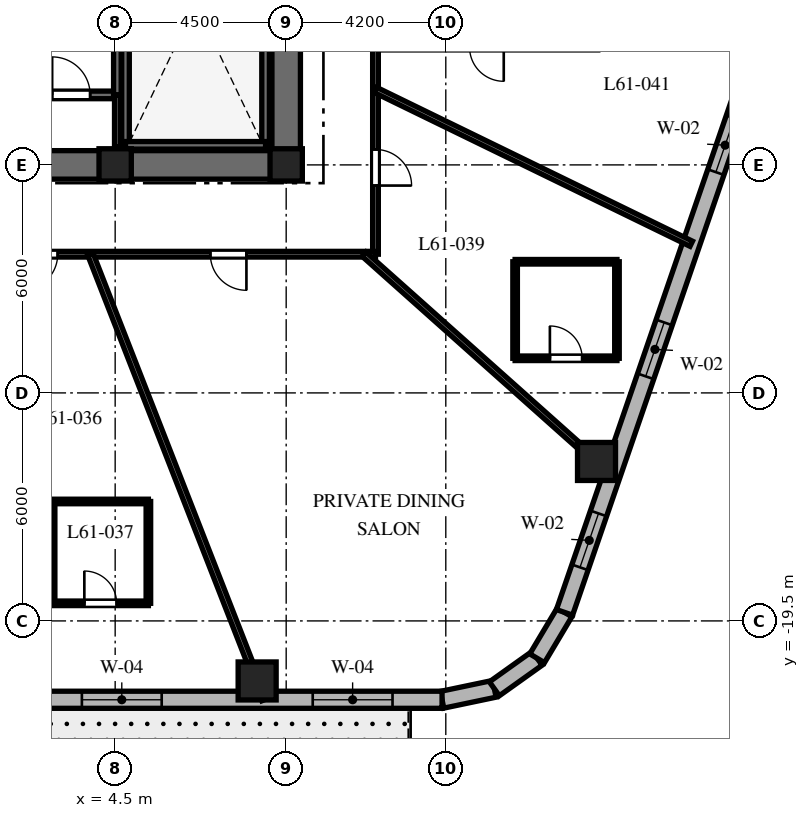
"""IFC4 building model, lengths in metres.
Left out: names, types, materials, properties, quantities, classifications, styles, units other than length and angle.
Written with IfcOpenShell. Run it as: python <this file> out.ifc"""

import sys

from ifc_helpers import new_model, si_unit, direction, frame, frame_2d, origin, origin_2d, place, context, subcontext, project, spatial, rectangle, extrude, element, fill, save


model = new_model("IFC4")
c1 = context("Model", 3, precision=1e-05, world=origin(), true_north=direction((0.0, 1.0)))
c2 = subcontext(c1, "Body", "Model", "MODEL_VIEW")
j1 = project(units=[si_unit("LENGTHUNIT", "METRE"), si_unit("PLANEANGLEUNIT", "RADIAN")], contexts=[c1])
p1 = place(None, origin())
s1 = spatial("IfcSite", under=j1, at=p1, CompositionType="ELEMENT")
p2 = place(p1, origin())
s2 = spatial("IfcBuilding", under=s1, at=p2, CompositionType="ELEMENT")
p3 = place(p2, frame((0.0, 0.0, 244.5)))
s3 = spatial("IfcBuildingStorey", under=s2, at=p3, CompositionType="ELEMENT", Elevation=244.5)
p4 = place(p3, frame((-9.375, -7.5, 0.0), z_axis=(0.0, 0.0, 1.0), x_axis=(1.0, 0.0, 0.0)))
e1 = element("IfcWall", 1, at=p4, inside=s3, PredefinedType="SHEAR", context=c2, shape_type="SweptSolid", body=[
    extrude(rectangle(XDim=18.75, YDim=0.75, at=frame_2d((9.375, 0.0))), origin(), (0.0, 0.0, 1.0), 3.8),
])
p5 = place(p4, frame((9.425, 0.0, 0.0)))
e2 = element("IfcOpeningElement", 2, at=p5, cuts=e1, PredefinedType="OPENING", context=c2, shape_type="SweptSolid", body=[
    extrude(rectangle(XDim=1.0, YDim=2.15, at=frame_2d((0.5, 1.075))), frame((0.0, 0.385, 0.0), z_axis=(0.0, -1.0, 0.0), x_axis=(1.0, 0.0, 0.0)), (0.0, 0.0, 1.0), 0.77),
])
p6 = place(p3, frame((9.0, -7.125, 0.0), z_axis=(0.0, 0.0, 1.0), x_axis=(0.0, 1.0, 0.0)))
e3 = element("IfcWall", 3, at=p6, inside=s3, PredefinedType="SHEAR", context=c2, shape_type="SweptSolid", body=[
    extrude(rectangle(XDim=14.25, YDim=0.75, at=frame_2d((7.125, 0.0))), origin(), (0.0, 0.0, 1.0), 3.8),
])
p7 = place(p6, frame((10.25, 0.0, 0.0)))
e4 = element("IfcOpeningElement", 4, at=p7, cuts=e3, PredefinedType="OPENING", context=c2, shape_type="SweptSolid", body=[
    extrude(rectangle(XDim=1.05, YDim=2.15, at=frame_2d((0.525, 1.075))), frame((0.0, 0.385, 0.0), z_axis=(0.0, -1.0, 0.0), x_axis=(1.0, 0.0, 0.0)), (0.0, 0.0, 1.0), 0.77),
])
for number, where, z_axis, x_axis in (
    (5, (4.772, -6.985, 0.0), (0.0, 0.0, 1.0), (0.0, 1.0, 0.0)),
    (6, (8.458, -6.985, 0.0), (0.0, 0.0, 1.0), (0.0, 1.0, 0.0)),
):
    element("IfcWall", number, at=place(p3, frame(where, z_axis=z_axis, x_axis=x_axis)), inside=s3, PredefinedType="SHEAR", context=c2, shape_type="SweptSolid", body=[
        extrude(rectangle(XDim=9.143, YDim=0.2, at=frame_2d((4.572, 0.0))), origin(), (0.0, 0.0, 1.0), 3.8),
    ])
p8 = place(p3, frame((4.772, -6.985, 0.0), z_axis=(0.0, 0.0, 1.0), x_axis=(1.0, 0.0, 0.0)))
e7 = element("IfcWall", 7, at=p8, inside=s3, PredefinedType="SHEAR", context=c2, shape_type="SweptSolid", body=[
    extrude(rectangle(XDim=3.686, YDim=0.2, at=frame_2d((1.843, 0.0))), origin(), (0.0, 0.0, 1.0), 3.8),
])
p9 = place(p3, frame((-4.608, -5.658, 0.0), z_axis=(0.0, 0.0, 1.0), x_axis=(1.0, 0.0, 0.0)))
e8 = element("IfcWall", 8, at=p9, inside=s3, PredefinedType="SHEAR", context=c2, shape_type="SweptSolid", body=[
    extrude(rectangle(XDim=9.166, YDim=0.2, at=frame_2d((4.583, 0.0))), origin(), (0.0, 0.0, 1.0), 3.8),
])
p10 = place(p9, frame((7.45, 0.0, 0.0)))
e9 = element("IfcOpeningElement", 9, at=p10, cuts=e8, PredefinedType="OPENING", context=c2, shape_type="SweptSolid", body=[
    extrude(rectangle(XDim=1.0, YDim=2.15, at=frame_2d((0.5, 1.075))), frame((0.0, 0.11, 0.0), z_axis=(0.0, -1.0, 0.0), x_axis=(1.0, 0.0, 0.0)), (0.0, 0.0, 1.0), 0.22),
])
p11 = place(p3, frame((4.558, -5.658, 0.0), z_axis=(0.0, 0.0, 1.0), x_axis=(0.0, 1.0, 0.0)))
e10 = element("IfcWall", 10, at=p11, inside=s3, PredefinedType="SHEAR", context=c2, shape_type="SweptSolid", body=[
    extrude(rectangle(XDim=3.686, YDim=0.2, at=frame_2d((1.843, 0.0))), origin(), (0.0, 0.0, 1.0), 3.8),
])
for number, where, z_axis, x_axis in (
    (11, (4.5, -7.5, 0.0), (0.0, 0.0, 1.0), (1.0, 0.0, 0.0)),
    (12, (9.0, -7.5, 0.0), (0.0, 0.0, 1.0), (1.0, 0.0, 0.0)),
):
    element("IfcColumn", number, at=place(p3, frame(where, z_axis=z_axis, x_axis=x_axis)), inside=s3, PredefinedType="COLUMN", context=c2, shape_type="SweptSolid", body=[
        extrude(rectangle(XDim=0.85, YDim=0.85, at=origin_2d()), origin(), (0.0, 0.0, 1.0), 3.8),
    ])
for number, where, z_axis, x_axis in (
    (13, (8.236, -21.08, 0.0), (0.0, 0.0, 1.0), (1.0, 0.0, 0.0)),
    (14, (17.166, -15.304, 0.0), (0.0, 0.0, 1.0), (1.0, 0.0, 0.0)),
):
    element("IfcColumn", number, at=place(p3, frame(where, z_axis=z_axis, x_axis=x_axis)), inside=s3, PredefinedType="COLUMN", context=c2, shape_type="SweptSolid", body=[
        extrude(rectangle(XDim=1.0, YDim=1.0, at=origin_2d()), origin(), (0.0, 0.0, 1.0), 3.8),
    ])
p12 = place(p3, frame((13.102, -21.575, 0.0), z_axis=(0.0, 0.0, 1.0), x_axis=(0.978757421505, 0.205021730188, 0.0)))
e15 = element("IfcWall", 15, at=p12, inside=s3, PredefinedType="SOLIDWALL", context=c2, shape_type="SweptSolid", body=[
    extrude(rectangle(XDim=1.406, YDim=0.45, at=frame_2d((0.703, 0.0))), origin(), (0.0, 0.0, 1.0), 3.5),
])
p13 = place(p3, frame((14.478, -21.287, 0.0), z_axis=(0.0, 0.0, 1.0), x_axis=(0.813888518617, 0.58102106611, 0.0)))
e16 = element("IfcWall", 16, at=p13, inside=s3, PredefinedType="SOLIDWALL", context=c2, shape_type="SweptSolid", body=[
    extrude(rectangle(XDim=1.383, YDim=0.45, at=frame_2d((0.691, 0.0))), origin(), (0.0, 0.0, 1.0), 3.5),
])
p14 = place(p3, frame((15.604, -20.483, 0.0), z_axis=(0.0, 0.0, 1.0), x_axis=(0.512222149036, 0.858852996756, 0.0)))
e17 = element("IfcWall", 17, at=p14, inside=s3, PredefinedType="SOLIDWALL", context=c2, shape_type="SweptSolid", body=[
    extrude(rectangle(XDim=1.406, YDim=0.45, at=frame_2d((0.703, 0.0))), origin(), (0.0, 0.0, 1.0), 3.5),
])
p15 = place(p3, frame((-11.298, -21.575, 0.0), z_axis=(0.0, 0.0, 1.0), x_axis=(1.0, 0.0, 0.0)))
e18 = element("IfcWall", 18, at=p15, inside=s3, PredefinedType="SOLIDWALL", context=c2, shape_type="SweptSolid", body=[
    extrude(rectangle(XDim=24.399, YDim=0.45, at=frame_2d((12.2, 0.0))), origin(), (0.0, 0.0, 1.0), 3.5),
])
p16 = place(p15, frame((2.55, 0.0, 0.0)))
e19 = element("IfcOpeningElement", 19, at=p16, cuts=e18, PredefinedType="OPENING", context=c2, shape_type="SweptSolid", body=[
    extrude(rectangle(XDim=1.0, YDim=2.15, at=frame_2d((0.5, 1.075))), frame((0.0, 0.235, 0.0), z_axis=(0.0, -1.0, 0.0), x_axis=(1.0, 0.0, 0.0)), (0.0, 0.0, 1.0), 0.47),
])
p17 = place(p15, frame((8.169, 0.0, 0.8)))
e20 = element("IfcOpeningElement", 20, at=p17, cuts=e18, PredefinedType="OPENING", context=c2, shape_type="SweptSolid", body=[
    extrude(rectangle(XDim=2.1, YDim=1.85, at=frame_2d((1.05, 0.925))), frame((0.0, 0.235, 0.0), z_axis=(0.0, -1.0, 0.0), x_axis=(1.0, 0.0, 0.0)), (0.0, 0.0, 1.0), 0.47),
])
p18 = place(p15, frame((14.922, 0.0, 0.8)))
e21 = element("IfcOpeningElement", 21, at=p18, cuts=e18, PredefinedType="OPENING", context=c2, shape_type="SweptSolid", body=[
    extrude(rectangle(XDim=2.1, YDim=1.85, at=frame_2d((1.05, 0.925))), frame((0.0, 0.235, 0.0), z_axis=(0.0, -1.0, 0.0), x_axis=(1.0, 0.0, 0.0)), (0.0, 0.0, 1.0), 0.47),
])
p19 = place(p15, frame((20.996, 0.0, 0.8)))
e22 = element("IfcOpeningElement", 22, at=p19, cuts=e18, PredefinedType="OPENING", context=c2, shape_type="SweptSolid", body=[
    extrude(rectangle(XDim=2.1, YDim=1.85, at=frame_2d((1.05, 0.925))), frame((0.0, 0.235, 0.0), z_axis=(0.0, -1.0, 0.0), x_axis=(1.0, 0.0, 0.0)), (0.0, 0.0, 1.0), 0.47),
])
p20 = place(p3, frame((16.324, -19.275, 0.0), z_axis=(0.0, 0.0, 1.0), x_axis=(0.325083142304, 0.945685439557, 0.0)))
e23 = element("IfcWall", 23, at=p20, inside=s3, PredefinedType="SOLIDWALL", context=c2, shape_type="SweptSolid", body=[
    extrude(rectangle(XDim=20.224, YDim=0.45, at=frame_2d((10.112, 0.0))), origin(), (0.0, 0.0, 1.0), 3.5),
])
p21 = place(p20, frame((1.253, 0.0, 0.8)))
e24 = element("IfcOpeningElement", 24, at=p21, cuts=e23, PredefinedType="OPENING", context=c2, shape_type="SweptSolid", body=[
    extrude(rectangle(XDim=1.5, YDim=1.8, at=frame_2d((0.75, 0.9))), frame((0.0, 0.235, 0.0), z_axis=(0.0, -1.0, 0.0), x_axis=(1.0, 0.0, 0.0)), (0.0, 0.0, 1.0), 0.47),
])
p22 = place(p20, frame((6.568, 0.0, 0.8)))
e25 = element("IfcOpeningElement", 25, at=p22, cuts=e23, PredefinedType="OPENING", context=c2, shape_type="SweptSolid", body=[
    extrude(rectangle(XDim=1.5, YDim=1.8, at=frame_2d((0.75, 0.9))), frame((0.0, 0.235, 0.0), z_axis=(0.0, -1.0, 0.0), x_axis=(1.0, 0.0, 0.0)), (0.0, 0.0, 1.0), 0.47),
])
p23 = place(p20, frame((12.25, 0.0, 0.8)))
e26 = element("IfcOpeningElement", 26, at=p23, cuts=e23, PredefinedType="OPENING", context=c2, shape_type="SweptSolid", body=[
    extrude(rectangle(XDim=1.5, YDim=1.8, at=frame_2d((0.75, 0.9))), frame((0.0, 0.235, 0.0), z_axis=(0.0, -1.0, 0.0), x_axis=(1.0, 0.0, 0.0)), (0.0, 0.0, 1.0), 0.47),
])
p24 = place(p20, frame((17.418, 0.0, 0.8)))
e27 = element("IfcOpeningElement", 27, at=p24, cuts=e23, PredefinedType="OPENING", context=c2, shape_type="SweptSolid", body=[
    extrude(rectangle(XDim=1.5, YDim=1.8, at=frame_2d((0.75, 0.9))), frame((0.0, 0.235, 0.0), z_axis=(0.0, -1.0, 0.0), x_axis=(1.0, 0.0, 0.0)), (0.0, 0.0, 1.0), 0.47),
])
p25 = place(p3, frame((4.558, -7.02, 0.0), z_axis=(0.0, 0.0, 1.0), x_axis=(0.0, 1.0, 0.0)))
e28 = element("IfcWall", 28, at=p25, inside=s3, PredefinedType="PARTITIONING", context=c2, shape_type="SweptSolid", body=[
    extrude(rectangle(XDim=1.362, YDim=0.15, at=frame_2d((0.681, 0.0))), origin(), (0.0, 0.0, 1.0), 3.5),
])
p26 = place(p3, frame((11.35, -4.4, 0.0), z_axis=(0.0, 0.0, 1.0), x_axis=(0.0, -1.0, 0.0)))
e29 = element("IfcWall", 29, at=p26, inside=s3, PredefinedType="PARTITIONING", context=c2, shape_type="SweptSolid", body=[
    extrude(rectangle(XDim=5.45, YDim=0.15, at=frame_2d((2.725, 0.0))), origin(), (0.0, 0.0, 1.0), 2.99),
])
p27 = place(p26, frame((2.694, 0.0, 0.0)))
e30 = element("IfcOpeningElement", 30, at=p27, cuts=e29, PredefinedType="OPENING", context=c2, shape_type="SweptSolid", body=[
    extrude(rectangle(XDim=0.95, YDim=2.03, at=frame_2d((0.475, 1.015))), frame((0.0, 0.085, 0.0), z_axis=(0.0, -1.0, 0.0), x_axis=(1.0, 0.0, 0.0)), (0.0, 0.0, 1.0), 0.17),
])
p28 = place(p3, frame((11.35, -9.85, 0.0), z_axis=(0.0, 0.0, 1.0), x_axis=(-1.0, 0.0, 0.0)))
e31 = element("IfcWall", 31, at=p28, inside=s3, PredefinedType="PARTITIONING", context=c2, shape_type="SweptSolid", body=[
    extrude(rectangle(XDim=10.43, YDim=0.15, at=frame_2d((5.215, 0.0))), origin(), (0.0, 0.0, 1.0), 2.99),
])
p29 = place(p28, frame((8.362, 0.0, 0.0)))
e32 = element("IfcOpeningElement", 32, at=p29, cuts=e31, PredefinedType="OPENING", context=c2, shape_type="SweptSolid", body=[
    extrude(rectangle(XDim=0.95, YDim=2.03, at=frame_2d((0.475, 1.015))), frame((0.0, 0.085, 0.0), z_axis=(0.0, -1.0, 0.0), x_axis=(1.0, 0.0, 0.0)), (0.0, 0.0, 1.0), 0.17),
])
p30 = place(p28, frame((3.396, 0.0, 0.0)))
e33 = element("IfcOpeningElement", 33, at=p30, cuts=e31, PredefinedType="OPENING", context=c2, shape_type="SweptSolid", body=[
    extrude(rectangle(XDim=0.95, YDim=2.03, at=frame_2d((0.475, 1.015))), frame((0.0, 0.085, 0.0), z_axis=(0.0, -1.0, 0.0), x_axis=(1.0, 0.0, 0.0)), (0.0, 0.0, 1.0), 0.17),
])
p31 = place(p3, frame((3.848, -9.85, 0.0), z_axis=(0.0, 0.0, 1.0), x_axis=(0.363921778212, -0.931429513889, 0.0)))
e34 = element("IfcWall", 34, at=p31, inside=s3, PredefinedType="PARTITIONING", context=c2, shape_type="SweptSolid", body=[
    extrude(rectangle(XDim=12.588, YDim=0.15, at=frame_2d((6.294, 0.0))), origin(), (0.0, 0.0, 1.0), 2.74),
])
p32 = place(p3, frame((11.048, -9.85, 0.0), z_axis=(0.0, 0.0, 1.0), x_axis=(0.746444434655, -0.665447748492, 0.0)))
e35 = element("IfcWall", 35, at=p32, inside=s3, PredefinedType="PARTITIONING", context=c2, shape_type="SweptSolid", body=[
    extrude(rectangle(XDim=8.732, YDim=0.15, at=frame_2d((4.366, 0.0))), origin(), (0.0, 0.0, 1.0), 2.74),
])
p33 = place(p3, frame((11.35, -5.528, 0.0), z_axis=(0.0, 0.0, 1.0), x_axis=(0.899038669565, -0.437869239188, 0.0)))
e36 = element("IfcWall", 36, at=p33, inside=s3, PredefinedType="PARTITIONING", context=c2, shape_type="SweptSolid", body=[
    extrude(rectangle(XDim=9.242, YDim=0.15, at=frame_2d((4.621, 0.0))), origin(), (0.0, 0.0, 1.0), 2.74),
])
p34 = place(p3, frame((2.854, -19.037, 0.0), z_axis=(0.0, 0.0, 1.0), x_axis=(1.0, 0.0, 0.0)))
e37 = element("IfcWall", 37, at=p34, inside=s3, PredefinedType="PARTITIONING", context=c2, shape_type="SweptSolid", body=[
    extrude(rectangle(XDim=2.52, YDim=0.12, at=frame_2d((1.26, 0.0))), origin(), (0.0, 0.0, 1.0), 3.5),
])
p35 = place(p34, frame((0.835, 0.0, 0.0)))
e38 = element("IfcOpeningElement", 38, at=p35, cuts=e37, PredefinedType="OPENING", context=c2, shape_type="SweptSolid", body=[
    extrude(rectangle(XDim=0.85, YDim=2.03, at=frame_2d((0.425, 1.015))), frame((0.0, 0.07, 0.0), z_axis=(0.0, -1.0, 0.0), x_axis=(1.0, 0.0, 0.0)), (0.0, 0.0, 1.0), 0.14),
])
p36 = place(p3, frame((5.374, -19.037, 0.0), z_axis=(0.0, 0.0, 1.0), x_axis=(0.0, 1.0, 0.0)))
e39 = element("IfcWall", 39, at=p36, inside=s3, PredefinedType="PARTITIONING", context=c2, shape_type="SweptSolid", body=[
    extrude(rectangle(XDim=2.68, YDim=0.12, at=frame_2d((1.34, 0.0))), origin(), (0.0, 0.0, 1.0), 2.94),
])
p37 = place(p3, frame((5.374, -16.357, 0.0), z_axis=(0.0, 0.0, 1.0), x_axis=(-1.0, 0.0, 0.0)))
e40 = element("IfcWall", 40, at=p37, inside=s3, PredefinedType="PARTITIONING", context=c2, shape_type="SweptSolid", body=[
    extrude(rectangle(XDim=2.52, YDim=0.12, at=frame_2d((1.26, 0.0))), origin(), (0.0, 0.0, 1.0), 3.5),
])
p38 = place(p3, frame((2.854, -16.357, 0.0), z_axis=(0.0, 0.0, 1.0), x_axis=(0.0, -1.0, 0.0)))
e41 = element("IfcWall", 41, at=p38, inside=s3, PredefinedType="PARTITIONING", context=c2, shape_type="SweptSolid", body=[
    extrude(rectangle(XDim=2.68, YDim=0.12, at=frame_2d((1.34, 0.0))), origin(), (0.0, 0.0, 1.0), 2.94),
])
p39 = place(p3, frame((15.024, -12.589, 0.0), z_axis=(0.0, 0.0, 1.0), x_axis=(1.0, 0.0, 0.0)))
e42 = element("IfcWall", 42, at=p39, inside=s3, PredefinedType="PARTITIONING", context=c2, shape_type="SweptSolid", body=[
    extrude(rectangle(XDim=2.68, YDim=0.12, at=frame_2d((1.34, 0.0))), origin(), (0.0, 0.0, 1.0), 3.5),
])
p40 = place(p39, frame((0.915, 0.0, 0.0)))
e43 = element("IfcOpeningElement", 43, at=p40, cuts=e42, PredefinedType="OPENING", context=c2, shape_type="SweptSolid", body=[
    extrude(rectangle(XDim=0.85, YDim=2.03, at=frame_2d((0.425, 1.015))), frame((0.0, 0.07, 0.0), z_axis=(0.0, -1.0, 0.0), x_axis=(1.0, 0.0, 0.0)), (0.0, 0.0, 1.0), 0.14),
])
p41 = place(p3, frame((17.704, -12.589, 0.0), z_axis=(0.0, 0.0, 1.0), x_axis=(0.0, 1.0, 0.0)))
e44 = element("IfcWall", 44, at=p41, inside=s3, PredefinedType="PARTITIONING", context=c2, shape_type="SweptSolid", body=[
    extrude(rectangle(XDim=2.54, YDim=0.12, at=frame_2d((1.27, 0.0))), origin(), (0.0, 0.0, 1.0), 3.5),
])
p42 = place(p3, frame((17.704, -10.049, 0.0), z_axis=(0.0, 0.0, 1.0), x_axis=(-1.0, 0.0, 0.0)))
e45 = element("IfcWall", 45, at=p42, inside=s3, PredefinedType="PARTITIONING", context=c2, shape_type="SweptSolid", body=[
    extrude(rectangle(XDim=2.68, YDim=0.12, at=frame_2d((1.34, 0.0))), origin(), (0.0, 0.0, 1.0), 3.073),
])
p43 = place(p3, frame((15.024, -10.049, 0.0), z_axis=(0.0, 0.0, 1.0), x_axis=(0.0, -1.0, 0.0)))
e46 = element("IfcWall", 46, at=p43, inside=s3, PredefinedType="PARTITIONING", context=c2, shape_type="SweptSolid", body=[
    extrude(rectangle(XDim=2.54, YDim=0.12, at=frame_2d((1.27, 0.0))), origin(), (0.0, 0.0, 1.0), 3.073),
])
p44 = place(p18, origin())
e47 = element("IfcWindow", 47, at=p44, inside=s3, PartitioningType="SINGLE_PANEL", PredefinedType="WINDOW", context=c2, shape_type="SweptSolid", body=[
    extrude(rectangle(XDim=2.1, YDim=1.85, at=frame_2d((1.05, 0.925))), frame((0.0, 0.03, 0.0), z_axis=(0.0, -1.0, 0.0), x_axis=(1.0, 0.0, 0.0)), (0.0, 0.0, 1.0), 0.06),
])
fill(e21, e47)
p45 = place(p19, origin())
e48 = element("IfcWindow", 48, at=p45, inside=s3, PartitioningType="SINGLE_PANEL", PredefinedType="WINDOW", context=c2, shape_type="SweptSolid", body=[
    extrude(rectangle(XDim=2.1, YDim=1.85, at=frame_2d((1.05, 0.925))), frame((0.0, 0.03, 0.0), z_axis=(0.0, -1.0, 0.0), x_axis=(1.0, 0.0, 0.0)), (0.0, 0.0, 1.0), 0.06),
])
fill(e22, e48)
p46 = place(p21, origin())
e49 = element("IfcWindow", 49, at=p46, inside=s3, PartitioningType="SINGLE_PANEL", PredefinedType="WINDOW", context=c2, shape_type="SweptSolid", body=[
    extrude(rectangle(XDim=1.5, YDim=1.8, at=frame_2d((0.75, 0.9))), frame((0.0, 0.03, 0.0), z_axis=(0.0, -1.0, 0.0), x_axis=(1.0, 0.0, 0.0)), (0.0, 0.0, 1.0), 0.06),
])
fill(e24, e49)
p47 = place(p22, origin())
e50 = element("IfcWindow", 50, at=p47, inside=s3, PartitioningType="SINGLE_PANEL", PredefinedType="WINDOW", context=c2, shape_type="SweptSolid", body=[
    extrude(rectangle(XDim=1.5, YDim=1.8, at=frame_2d((0.75, 0.9))), frame((0.0, 0.03, 0.0), z_axis=(0.0, -1.0, 0.0), x_axis=(1.0, 0.0, 0.0)), (0.0, 0.0, 1.0), 0.06),
])
fill(e25, e50)
p48 = place(p23, origin())
e51 = element("IfcWindow", 51, at=p48, inside=s3, PartitioningType="SINGLE_PANEL", PredefinedType="WINDOW", context=c2, shape_type="SweptSolid", body=[
    extrude(rectangle(XDim=1.5, YDim=1.8, at=frame_2d((0.75, 0.9))), frame((0.0, 0.03, 0.0), z_axis=(0.0, -1.0, 0.0), x_axis=(1.0, 0.0, 0.0)), (0.0, 0.0, 1.0), 0.06),
])
fill(e26, e51)
p49 = place(p10, origin())
e52 = element("IfcDoor", 52, at=p49, inside=s3, OperationType="SINGLE_SWING_LEFT", PredefinedType="DOOR", context=c2, shape_type="SweptSolid", body=[
    extrude(rectangle(XDim=1.0, YDim=2.15, at=frame_2d((0.5, 1.075))), frame((0.0, 0.025, 0.0), z_axis=(0.0, -1.0, 0.0), x_axis=(1.0, 0.0, 0.0)), (0.0, 0.0, 1.0), 0.05),
])
fill(e9, e52)
p50 = place(p29, origin())
e53 = element("IfcDoor", 53, at=p50, inside=s3, OperationType="SINGLE_SWING_RIGHT", PredefinedType="DOOR", context=c2, shape_type="SweptSolid", body=[
    extrude(rectangle(XDim=0.95, YDim=2.03, at=frame_2d((0.475, 1.015))), frame((0.0, 0.025, 0.0), z_axis=(0.0, -1.0, 0.0), x_axis=(1.0, 0.0, 0.0)), (0.0, 0.0, 1.0), 0.05),
])
fill(e32, e53)
p51 = place(p35, origin())
e54 = element("IfcDoor", 54, at=p51, inside=s3, OperationType="SINGLE_SWING_LEFT", PredefinedType="DOOR", context=c2, shape_type="SweptSolid", body=[
    extrude(rectangle(XDim=0.85, YDim=2.03, at=frame_2d((0.425, 1.015))), frame((0.0, 0.025, 0.0), z_axis=(0.0, -1.0, 0.0), x_axis=(1.0, 0.0, 0.0)), (0.0, 0.0, 1.0), 0.05),
])
fill(e38, e54)
p52 = place(p30, origin())
e55 = element("IfcDoor", 55, at=p52, inside=s3, OperationType="SINGLE_SWING_LEFT", PredefinedType="DOOR", context=c2, shape_type="SweptSolid", body=[
    extrude(rectangle(XDim=0.95, YDim=2.03, at=frame_2d((0.475, 1.015))), frame((0.0, 0.025, 0.0), z_axis=(0.0, -1.0, 0.0), x_axis=(1.0, 0.0, 0.0)), (0.0, 0.0, 1.0), 0.05),
])
fill(e33, e55)
p53 = place(p27, origin())
e56 = element("IfcDoor", 56, at=p53, inside=s3, OperationType="SINGLE_SWING_RIGHT", PredefinedType="DOOR", context=c2, shape_type="SweptSolid", body=[
    extrude(rectangle(XDim=0.95, YDim=2.03, at=frame_2d((0.475, 1.015))), frame((0.0, 0.025, 0.0), z_axis=(0.0, -1.0, 0.0), x_axis=(1.0, 0.0, 0.0)), (0.0, 0.0, 1.0), 0.05),
])
fill(e30, e56)
p54 = place(p40, origin())
e57 = element("IfcDoor", 57, at=p54, inside=s3, OperationType="SINGLE_SWING_LEFT", PredefinedType="DOOR", context=c2, shape_type="SweptSolid", body=[
    extrude(rectangle(XDim=0.85, YDim=2.03, at=frame_2d((0.425, 1.015))), frame((0.0, 0.025, 0.0), z_axis=(0.0, -1.0, 0.0), x_axis=(1.0, 0.0, 0.0)), (0.0, 0.0, 1.0), 0.05),
])
fill(e43, e57)
save(model, sys.argv[1])
